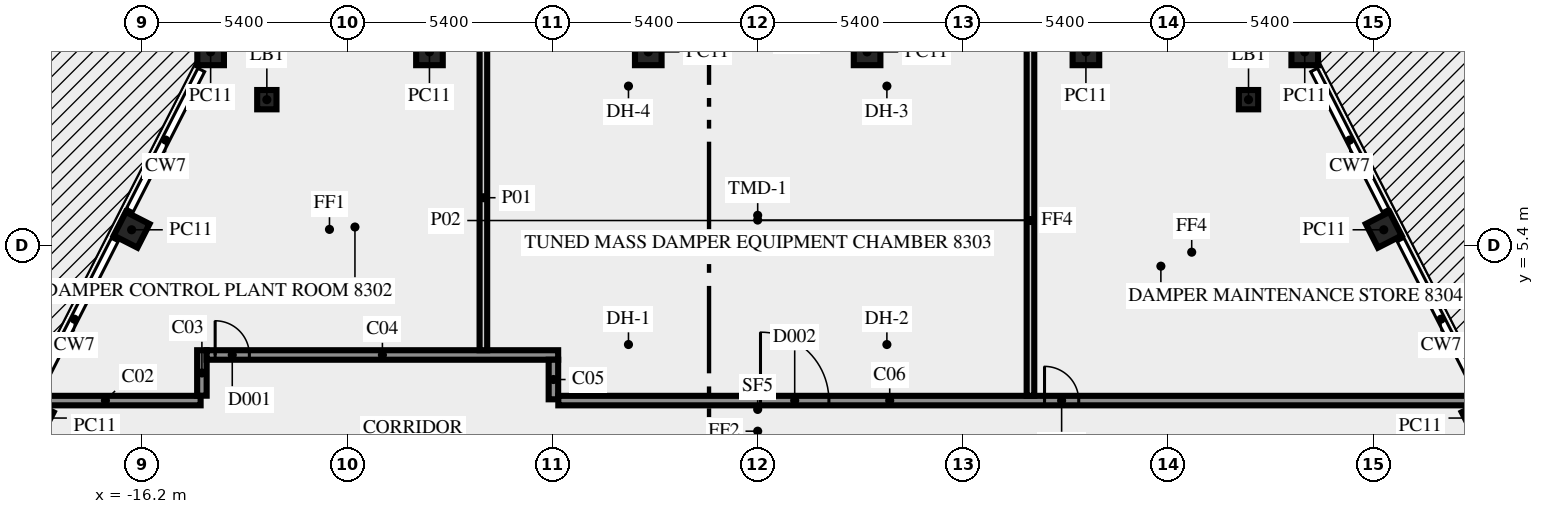
"""IFC4 building model, lengths in metres.
Left out: names, types, materials, properties, quantities, classifications, styles, units other than length and angle.
Written with IfcOpenShell. Run it as: python <this file> out.ifc"""

import sys

from ifc_helpers import new_model, si_unit, direction, frame, frame_2d, origin, origin_2d, place, context, subcontext, project, spatial, rectangle, hollow_rectangle, extrude, element, fill, save


model = new_model("IFC4")
c1 = context("Model", 3, precision=1e-05, world=origin(), true_north=direction((0.0, 1.0)))
c2 = subcontext(c1, "Body", "Model", "MODEL_VIEW")
j1 = project(units=[si_unit("LENGTHUNIT", "METRE"), si_unit("PLANEANGLEUNIT", "RADIAN")], contexts=[c1])
p1 = place(None, origin())
s1 = spatial("IfcSite", under=j1, at=p1, CompositionType="ELEMENT")
p2 = place(p1, origin())
s2 = spatial("IfcBuilding", under=s1, at=p2, CompositionType="ELEMENT")
p3 = place(p2, frame((0.0, 0.0, 355.0)))
s3 = spatial("IfcBuildingStorey", under=s2, at=p3, CompositionType="ELEMENT", Elevation=355.0)
for number, where, z_axis, x_axis in (
    (1, (-16.474, 5.819, 0.0), (0.0, 0.0, 1.0), (-0.454, -0.891, 0.0)),
    (2, (-18.998, 0.865, 0.0), (0.0, 0.0, 1.0), (-0.454, -0.891, 0.0)),
    (3, (18.998, 0.865, 0.0), (0.0, 0.0, 1.0), (-0.454, 0.891, 0.0)),
    (4, (16.474, 5.819, 0.0), (0.0, 0.0, 1.0), (-0.454, 0.891, 0.0)),
    (5, (14.395, 10.5, 0.0), (0.0, 0.0, 1.0), (-1.0, 0.0, 0.0)),
    (6, (8.637, 10.5, 0.0), (0.0, 0.0, 1.0), (-1.0, 0.0, 0.0)),
    (7, (2.879, 10.5, 0.0), (0.0, 0.0, 1.0), (-1.0, 0.0, 0.0)),
    (8, (-2.879, 10.5, 0.0), (0.0, 0.0, 1.0), (-1.0, 0.0, 0.0)),
    (9, (-8.637, 10.5, 0.0), (0.0, 0.0, 1.0), (-1.0, 0.0, 0.0)),
    (10, (-14.395, 10.5, 0.0), (0.0, 0.0, 1.0), (-1.0, 0.0, 0.0)),
):
    element("IfcColumn", number, at=place(p3, frame(where, z_axis=z_axis, x_axis=x_axis)), inside=s3, PredefinedType="COLUMN", context=c2, shape_type="SweptSolid", body=[
        extrude(rectangle(XDim=0.7, YDim=0.7, at=origin_2d()), origin(), (0.0, 0.0, 1.0), 7.55),
    ])
for number, where, z_axis, x_axis in (
    (11, (12.916, 9.243, 0.0), (0.0, 0.0, 1.0), (1.0, 0.0, 0.0)),
    (12, (-12.916, 9.243, 0.0), (0.0, 0.0, 1.0), (1.0, 0.0, 0.0)),
):
    element("IfcColumn", number, at=place(p3, frame(where, z_axis=z_axis, x_axis=x_axis)), inside=s3, PredefinedType="COLUMN", context=c2, shape_type="SweptSolid", body=[
        extrude(hollow_rectangle(XDim=0.508, YDim=0.508, WallThickness=0.016, at=origin_2d()), origin(), (0.0, 0.0, 1.0), 7.55),
    ])
p4 = place(p3, frame((-19.669, 1.325, 0.0), z_axis=(0.0, 0.0, 1.0), x_axis=(1.0, 0.0, 0.0)))
e13 = element("IfcWall", 13, at=p4, inside=s3, PredefinedType="SOLIDWALL", context=c2, shape_type="SweptSolid", body=[
    extrude(rectangle(XDim=5.01, YDim=0.25, at=frame_2d((2.505, 0.0))), origin(), (0.0, 0.0, 1.0), 7.55),
])
p5 = place(p3, frame((-14.625, 1.454, 0.0), z_axis=(0.0, 0.0, 1.0), x_axis=(0.0, 1.0, 0.0)))
e14 = element("IfcWall", 14, at=p5, inside=s3, PredefinedType="SOLIDWALL", context=c2, shape_type="SweptSolid", body=[
    extrude(rectangle(XDim=1.196, YDim=0.25, at=frame_2d((0.598, 0.0))), origin(), (0.0, 0.0, 1.0), 7.55),
])
p6 = place(p3, frame((-14.5, 2.525, 0.0), z_axis=(0.0, 0.0, 1.0), x_axis=(1.0, 0.0, 0.0)))
e15 = element("IfcWall", 15, at=p6, inside=s3, PredefinedType="SOLIDWALL", context=c2, shape_type="SweptSolid", body=[
    extrude(rectangle(XDim=9.25, YDim=0.25, at=frame_2d((4.625, 0.0))), origin(), (0.0, 0.0, 1.0), 7.55),
])
p7 = place(p6, frame((0.224, 0.0, 0.0)))
e16 = element("IfcOpeningElement", 16, at=p7, cuts=e15, PredefinedType="OPENING", context=c2, shape_type="SweptSolid", body=[
    extrude(rectangle(XDim=0.9, YDim=2.1, at=frame_2d((0.45, 1.05))), frame((0.0, 0.135, 0.0), z_axis=(0.0, -1.0, 0.0), x_axis=(1.0, 0.0, 0.0)), (0.0, 0.0, 1.0), 0.27),
])
p8 = place(p3, frame((-5.375, 2.4, 0.0), z_axis=(0.0, 0.0, 1.0), x_axis=(0.0, -1.0, 0.0)))
e17 = element("IfcWall", 17, at=p8, inside=s3, PredefinedType="SOLIDWALL", context=c2, shape_type="SweptSolid", body=[
    extrude(rectangle(XDim=1.041, YDim=0.25, at=frame_2d((0.521, 0.0))), origin(), (0.0, 0.0, 1.0), 7.55),
])
p9 = place(p3, frame((-5.246, 1.325, 0.0), z_axis=(0.0, 0.0, 1.0), x_axis=(1.0, 0.0, 0.0)))
e18 = element("IfcWall", 18, at=p9, inside=s3, PredefinedType="SOLIDWALL", context=c2, shape_type="SweptSolid", body=[
    extrude(rectangle(XDim=24.916, YDim=0.25, at=frame_2d((12.458, 0.0))), origin(), (0.0, 0.0, 1.0), 7.55),
])
p10 = place(p9, frame((5.32, 0.0, 0.0)))
e19 = element("IfcOpeningElement", 19, at=p10, cuts=e18, PredefinedType="OPENING", context=c2, shape_type="SweptSolid", body=[
    extrude(rectangle(XDim=1.8, YDim=2.1, at=frame_2d((0.9, 1.05))), frame((0.0, 0.135, 0.0), z_axis=(0.0, -1.0, 0.0), x_axis=(1.0, 0.0, 0.0)), (0.0, 0.0, 1.0), 0.27),
])
p11 = place(p9, frame((12.794, 0.0, 0.0)))
e20 = element("IfcOpeningElement", 20, at=p11, cuts=e18, PredefinedType="OPENING", context=c2, shape_type="SweptSolid", body=[
    extrude(rectangle(XDim=0.9, YDim=2.1, at=frame_2d((0.45, 1.05))), frame((0.0, 0.135, 0.0), z_axis=(0.0, -1.0, 0.0), x_axis=(1.0, 0.0, 0.0)), (0.0, 0.0, 1.0), 0.27),
])
p12 = place(p3, frame((-7.218, 2.65, 0.0), z_axis=(0.0, 0.0, 1.0), x_axis=(0.0, 1.0, 0.0)))
e21 = element("IfcWall", 21, at=p12, inside=s3, PredefinedType="SOLIDWALL", context=c2, shape_type="SweptSolid", body=[
    extrude(rectangle(XDim=8.026, YDim=0.2, at=frame_2d((4.013, 0.0))), origin(), (0.0, 0.0, 1.0), 5.75),
])
p13 = place(p3, frame((7.178, 1.45, 0.0), z_axis=(0.0, 0.0, 1.0), x_axis=(0.0, 1.0, 0.0)))
e22 = element("IfcWall", 22, at=p13, inside=s3, PredefinedType="SOLIDWALL", context=c2, shape_type="SweptSolid", body=[
    extrude(rectangle(XDim=9.226, YDim=0.2, at=frame_2d((4.613, 0.0))), origin(), (0.0, 0.0, 1.0), 5.75),
])
p14 = place(p7, origin())
e23 = element("IfcDoor", 23, at=p14, inside=s3, OperationType="SINGLE_SWING_LEFT", PredefinedType="DOOR", context=c2, shape_type="SweptSolid", body=[
    extrude(rectangle(XDim=0.9, YDim=2.1, at=frame_2d((0.45, 1.05))), frame((0.0, 0.025, 0.0), z_axis=(0.0, -1.0, 0.0), x_axis=(1.0, 0.0, 0.0)), (0.0, 0.0, 1.0), 0.05),
])
fill(e16, e23)
p15 = place(p10, origin())
e24 = element("IfcDoor", 24, at=p15, inside=s3, OperationType="DOUBLE_DOOR_SINGLE_SWING", PredefinedType="DOOR", context=c2, shape_type="SweptSolid", body=[
    extrude(rectangle(XDim=1.8, YDim=2.1, at=frame_2d((0.9, 1.05))), frame((0.0, 0.025, 0.0), z_axis=(0.0, -1.0, 0.0), x_axis=(1.0, 0.0, 0.0)), (0.0, 0.0, 1.0), 0.05),
])
fill(e19, e24)
p16 = place(p11, origin())
e25 = element("IfcDoor", 25, at=p16, inside=s3, OperationType="SINGLE_SWING_LEFT", PredefinedType="DOOR", context=c2, shape_type="SweptSolid", body=[
    extrude(rectangle(XDim=0.9, YDim=2.1, at=frame_2d((0.45, 1.05))), frame((0.0, 0.025, 0.0), z_axis=(0.0, -1.0, 0.0), x_axis=(1.0, 0.0, 0.0)), (0.0, 0.0, 1.0), 0.05),
])
fill(e20, e25)
save(model, sys.argv[1])
